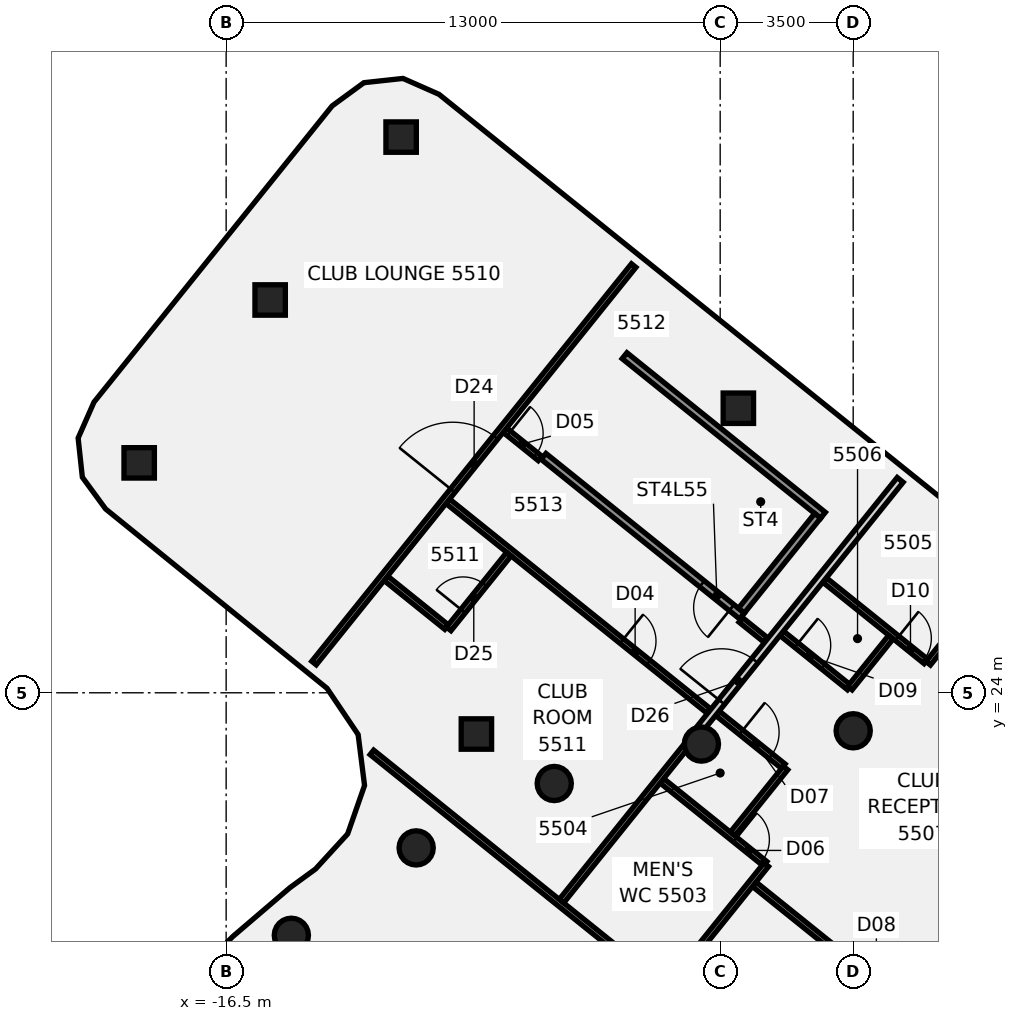
"""IFC4 building model, lengths in metres.
Left out: names, types, materials, properties, quantities, classifications, styles, units other than length and angle.
Written with IfcOpenShell. Run it as: python <this file> out.ifc"""

import sys

from ifc_helpers import new_model, si_unit, direction, frame, frame_2d, origin, origin_2d, place, context, subcontext, project, spatial, polyline, rectangle, circle, outline, extrude, element, fill, save


model = new_model("IFC4")
c1 = context("Model", 3, precision=1e-05, world=origin(), true_north=direction((0.0, 1.0)))
c2 = subcontext(c1, "Body", "Model", "MODEL_VIEW")
j1 = project(units=[si_unit("LENGTHUNIT", "METRE"), si_unit("PLANEANGLEUNIT", "RADIAN")], contexts=[c1])
p1 = place(None, origin())
s1 = spatial("IfcSite", under=j1, at=p1, CompositionType="ELEMENT")
p2 = place(p1, origin())
s2 = spatial("IfcBuilding", under=s1, at=p2, CompositionType="ELEMENT")
p3 = place(p2, frame((0.0, 0.0, 219.9)))
s3 = spatial("IfcBuildingStorey", under=s2, at=p3, CompositionType="ELEMENT", Elevation=219.9)
for number, where, z_axis, x_axis in (
    (1, (0.0, 23.0, -0.14), (0.0, 0.0, 1.0), (1.0, 0.0, 0.0)),
    (2, (-3.994, 22.651, -0.14), (0.0, 0.0, 1.0), (1.0, 0.0, 0.0)),
    (3, (-7.866, 21.613, -0.14), (0.0, 0.0, 1.0), (1.0, 0.0, 0.0)),
    (4, (-11.5, 19.919, -0.14), (0.0, 0.0, 1.0), (1.0, 0.0, 0.0)),
    (5, (-14.784, 17.619, -0.14), (0.0, 0.0, 1.0), (1.0, 0.0, 0.0)),
):
    element("IfcColumn", number, at=place(p3, frame(where, z_axis=z_axis, x_axis=x_axis)), inside=s3, PredefinedType="COLUMN", context=c2, shape_type="SweptSolid", body=[
        extrude(circle(Radius=0.45, at=origin_2d()), origin(), (0.0, 0.0, 1.0), 3.6),
    ])
p4 = place(p3, frame((-9.915, 22.915, -0.134), z_axis=(-0.004139601239, -0.050218113387, 0.998729695558), x_axis=(0.626044507658, 0.7786689847, 0.04174789452)))
e6 = element("IfcColumn", 6, at=p4, inside=s3, PredefinedType="COLUMN", context=c2, shape_type="SweptSolid", body=[
    extrude(rectangle(XDim=0.8, YDim=0.8, at=origin_2d()), origin(), (0.0, 0.0, 1.0), 3.598),
])
p5 = place(p3, frame((-3.022, 31.487, -0.135), z_axis=(-0.047839741947, -0.015743007279, 0.998730953166), x_axis=(0.778936132704, -0.626502812053, 0.027435882672)))
e7 = element("IfcColumn", 7, at=p5, inside=s3, PredefinedType="COLUMN", context=c2, shape_type="SweptSolid", body=[
    extrude(rectangle(XDim=0.8, YDim=0.8, at=origin_2d()), origin(), (0.0, 0.0, 1.0), 3.598),
])
p6 = place(p3, frame((-11.896, 38.622, -0.125), z_axis=(-0.018348621509, -0.110836507046, 0.993669259258), x_axis=(0.626012359155, 0.773649156908, 0.097854525701)))
e8 = element("IfcColumn", 8, at=p6, inside=s3, PredefinedType="COLUMN", context=c2, shape_type="SweptSolid", body=[
    extrude(rectangle(XDim=0.8, YDim=0.8, at=origin_2d()), origin(), (0.0, 0.0, 1.0), 3.606),
])
p7 = place(p3, frame((-15.342, 34.336, -0.127), z_axis=(0.003444931905, -0.127732671233, 0.991802650301), x_axis=(0.626633422835, 0.773203207147, 0.097403048434)))
e9 = element("IfcColumn", 9, at=p7, inside=s3, PredefinedType="COLUMN", context=c2, shape_type="SweptSolid", body=[
    extrude(rectangle(XDim=0.8, YDim=0.8, at=origin_2d()), origin(), (0.0, 0.0, 1.0), 3.614),
])
p8 = place(p3, frame((-18.788, 30.05, -0.129), z_axis=(0.025048097727, -0.144430563508, 0.989197859442), x_axis=(0.627776746317, 0.772342054291, 0.096871605529)))
e10 = element("IfcColumn", 10, at=p8, inside=s3, PredefinedType="COLUMN", context=c2, shape_type="SweptSolid", body=[
    extrude(rectangle(XDim=0.8, YDim=0.8, at=origin_2d()), origin(), (0.0, 0.0, 1.0), 3.626),
])
p9 = place(p3, frame((-12.665, 22.432, 0.0), z_axis=(0.0, 0.0, 1.0), x_axis=(0.779284245227, -0.626670619338, 0.0)))
e11 = element("IfcWall", 11, at=p9, inside=s3, PredefinedType="PARTITIONING", context=c2, shape_type="SweptSolid", body=[
    extrude(rectangle(XDim=16.621, YDim=0.15, at=frame_2d((8.311, 0.0))), origin(), (0.0, 0.0, 1.0), 2.864),
])
p10 = place(p3, frame((-12.294, 27.01, 0.0), z_axis=(0.0, 0.0, 1.0), x_axis=(0.779106968826, -0.626891004184, 0.0)))
e12 = element("IfcWall", 12, at=p10, inside=s3, PredefinedType="PARTITIONING", context=c2, shape_type="SweptSolid", body=[
    extrude(rectangle(XDim=2.045, YDim=0.15, at=frame_2d((1.022, 0.0))), origin(), (0.0, 0.0, 1.0), 2.864),
])
p11 = place(p3, frame((-10.665, 29.036, 0.0), z_axis=(0.0, 0.0, 1.0), x_axis=(0.779529978914, -0.626364919176, 0.0)))
e13 = element("IfcWall", 13, at=p11, inside=s3, PredefinedType="PARTITIONING", context=c2, shape_type="SweptSolid", body=[
    extrude(rectangle(XDim=8.8, YDim=0.15, at=frame_2d((4.4, 0.0))), origin(), (0.0, 0.0, 1.0), 2.864),
])
p12 = place(p11, frame((5.87, 0.0, 0.0)))
e14 = element("IfcOpeningElement", 14, at=p12, cuts=e13, PredefinedType="OPENING", context=c2, shape_type="SweptSolid", body=[
    extrude(rectangle(XDim=0.9, YDim=2.1, at=frame_2d((0.45, 1.05))), frame((0.0, 0.085, 0.0), z_axis=(0.0, -1.0, 0.0), x_axis=(1.0, 0.0, 0.0)), (0.0, 0.0, 1.0), 0.17),
])
p13 = place(p3, frame((-9.161, 30.907, 0.0), z_axis=(0.0, 0.0, 1.0), x_axis=(0.779191494895, -0.626785939763, 0.0)))
e15 = element("IfcWall", 15, at=p13, inside=s3, PredefinedType="PARTITIONING", context=c2, shape_type="SweptSolid", body=[
    extrude(rectangle(XDim=1.181, YDim=0.15, at=frame_2d((0.59, 0.0))), origin(), (0.0, 0.0, 1.0), 2.864),
])
p14 = place(p13, frame((0.131, 0.0, 0.0)))
e16 = element("IfcOpeningElement", 16, at=p14, cuts=e15, PredefinedType="OPENING", context=c2, shape_type="SweptSolid", body=[
    extrude(rectangle(XDim=0.9, YDim=2.1, at=frame_2d((0.45, 1.05))), frame((0.0, 0.085, 0.0), z_axis=(0.0, -1.0, 0.0), x_axis=(1.0, 0.0, 0.0)), (0.0, 0.0, 1.0), 0.17),
])
p15 = place(p3, frame((-2.958, 25.918, 0.0), z_axis=(0.0, 0.0, 1.0), x_axis=(0.77922270064, -0.626747144235, 0.0)))
e17 = element("IfcWall", 17, at=p15, inside=s3, PredefinedType="PARTITIONING", context=c2, shape_type="SweptSolid", body=[
    extrude(rectangle(XDim=0.841, YDim=0.15, at=frame_2d((0.42, 0.0))), origin(), (0.0, 0.0, 1.0), 2.864),
])
p16 = place(p3, frame((-5.03, 21.682, 0.0), z_axis=(0.0, 0.0, 1.0), x_axis=(0.779278251962, -0.626678072074, 0.0)))
e18 = element("IfcWall", 18, at=p16, inside=s3, PredefinedType="PARTITIONING", context=c2, shape_type="SweptSolid", body=[
    extrude(rectangle(XDim=3.48, YDim=0.15, at=frame_2d((1.74, 0.0))), origin(), (0.0, 0.0, 1.0), 2.864),
])
p17 = place(p16, frame((2.47, 0.0, 0.0)))
e19 = element("IfcOpeningElement", 19, at=p17, cuts=e18, PredefinedType="OPENING", context=c2, shape_type="SweptSolid", body=[
    extrude(rectangle(XDim=0.9, YDim=2.1, at=frame_2d((0.45, 1.05))), frame((0.0, 0.085, 0.0), z_axis=(0.0, -1.0, 0.0), x_axis=(1.0, 0.0, 0.0)), (0.0, 0.0, 1.0), 0.17),
])
p18 = place(p3, frame((-3.558, 23.449, 0.0), z_axis=(0.0, 0.0, 1.0), x_axis=(0.779441374228, -0.626475174401, 0.0)))
e20 = element("IfcWall", 20, at=p18, inside=s3, PredefinedType="PARTITIONING", context=c2, shape_type="SweptSolid", body=[
    extrude(rectangle(XDim=2.206, YDim=0.15, at=frame_2d((1.103, 0.0))), origin(), (0.0, 0.0, 1.0), 2.864),
])
p19 = place(p18, frame((0.78, 0.0, 0.0)))
e21 = element("IfcOpeningElement", 21, at=p19, cuts=e20, PredefinedType="OPENING", context=c2, shape_type="SweptSolid", body=[
    extrude(rectangle(XDim=1.0, YDim=2.1, at=frame_2d((0.5, 1.05))), frame((0.0, 0.085, 0.0), z_axis=(0.0, -1.0, 0.0), x_axis=(1.0, 0.0, 0.0)), (0.0, 0.0, 1.0), 0.17),
])
p20 = place(p3, frame((-2.601, 18.959, 0.0), z_axis=(0.0, 0.0, 1.0), x_axis=(0.779260240467, -0.626700468826, 0.0)))
e22 = element("IfcWall", 22, at=p20, inside=s3, PredefinedType="PARTITIONING", context=c2, shape_type="SweptSolid", body=[
    extrude(rectangle(XDim=11.079, YDim=0.15, at=frame_2d((5.54, 0.0))), origin(), (0.0, 0.0, 1.0), 2.864),
])
p21 = place(p20, frame((3.67, 0.0, 0.0)))
e23 = element("IfcOpeningElement", 23, at=p21, cuts=e22, PredefinedType="OPENING", context=c2, shape_type="SweptSolid", body=[
    extrude(rectangle(XDim=0.9, YDim=2.1, at=frame_2d((0.45, 1.05))), frame((0.0, 0.085, 0.0), z_axis=(0.0, -1.0, 0.0), x_axis=(1.0, 0.0, 0.0)), (0.0, 0.0, 1.0), 0.17),
])
p22 = place(p3, frame((-1.881, 25.565, 0.0), z_axis=(0.0, 0.0, 1.0), x_axis=(0.779446392233, -0.626468931101, 0.0)))
e24 = element("IfcWall", 24, at=p22, inside=s3, PredefinedType="PARTITIONING", context=c2, shape_type="SweptSolid", body=[
    extrude(rectangle(XDim=2.281, YDim=0.15, at=frame_2d((1.14, 0.0))), origin(), (0.0, 0.0, 1.0), 2.864),
])
p23 = place(p22, frame((0.5, 0.0, 0.0)))
e25 = element("IfcOpeningElement", 25, at=p23, cuts=e24, PredefinedType="OPENING", context=c2, shape_type="SweptSolid", body=[
    extrude(rectangle(XDim=0.9, YDim=2.1, at=frame_2d((0.45, 1.05))), frame((0.0, 0.085, 0.0), z_axis=(0.0, -1.0, 0.0), x_axis=(1.0, 0.0, 0.0)), (0.0, 0.0, 1.0), 0.17),
])
p24 = place(p3, frame((-0.738, 26.956, 0.0), z_axis=(0.0, 0.0, 1.0), x_axis=(0.779423789997, -0.626497051539, 0.0)))
e26 = element("IfcWall", 26, at=p24, inside=s3, PredefinedType="PARTITIONING", context=c2, shape_type="SweptSolid", body=[
    extrude(rectangle(XDim=3.4, YDim=0.15, at=frame_2d((1.7, 0.0))), origin(), (0.0, 0.0, 1.0), 2.864),
])
p25 = place(p24, frame((2.43, 0.0, 0.0)))
e27 = element("IfcOpeningElement", 27, at=p25, cuts=e26, PredefinedType="OPENING", context=c2, shape_type="SweptSolid", body=[
    extrude(rectangle(XDim=0.9, YDim=2.1, at=frame_2d((0.45, 1.05))), frame((0.0, 0.085, 0.0), z_axis=(0.0, -1.0, 0.0), x_axis=(1.0, 0.0, 0.0)), (0.0, 0.0, 1.0), 0.17),
])
p26 = place(p3, frame((-14.188, 24.782, 0.0), z_axis=(0.0, 0.0, 1.0), x_axis=(0.626733675184, 0.779233533923, 0.0)))
e28 = element("IfcWall", 28, at=p26, inside=s3, PredefinedType="PARTITIONING", context=c2, shape_type="SweptSolid", body=[
    extrude(rectangle(XDim=13.422, YDim=0.15, at=frame_2d((6.711, 0.0))), origin(), (0.0, 0.0, 1.0), 2.864),
])
p27 = place(p26, frame((5.823, 0.0, 0.0)))
e29 = element("IfcOpeningElement", 29, at=p27, cuts=e28, PredefinedType="OPENING", context=c2, shape_type="SweptSolid", body=[
    extrude(rectangle(XDim=1.8, YDim=2.1, at=frame_2d((0.9, 1.05))), frame((0.0, 0.085, 0.0), z_axis=(0.0, -1.0, 0.0), x_axis=(1.0, 0.0, 0.0)), (0.0, 0.0, 1.0), 0.17),
])
p28 = place(p3, frame((-10.642, 25.681, 0.0), z_axis=(0.0, 0.0, 1.0), x_axis=(0.626676843838, 0.77927923968, 0.0)))
e30 = element("IfcWall", 30, at=p28, inside=s3, PredefinedType="PARTITIONING", context=c2, shape_type="SweptSolid", body=[
    extrude(rectangle(XDim=2.521, YDim=0.15, at=frame_2d((1.261, 0.0))), origin(), (0.0, 0.0, 1.0), 2.864),
])
p29 = place(p28, frame((0.6, 0.0, 0.0)))
e31 = element("IfcOpeningElement", 31, at=p29, cuts=e30, PredefinedType="OPENING", context=c2, shape_type="SweptSolid", body=[
    extrude(rectangle(XDim=0.9, YDim=2.1, at=frame_2d((0.45, 1.05))), frame((0.0, 0.085, 0.0), z_axis=(0.0, -1.0, 0.0), x_axis=(1.0, 0.0, 0.0)), (0.0, 0.0, 1.0), 0.17),
])
p30 = place(p3, frame((-7.674, 18.521, 0.0), z_axis=(0.0, 0.0, 1.0), x_axis=(0.626662098772, 0.779291097064, 0.0)))
e32 = element("IfcWall", 32, at=p30, inside=s3, PredefinedType="PARTITIONING", context=c2, shape_type="SweptSolid", body=[
    extrude(rectangle(XDim=5.307, YDim=0.15, at=frame_2d((2.654, 0.0))), origin(), (0.0, 0.0, 1.0), 2.864),
])
p31 = place(p3, frame((-4.066, 23.008, 0.0), z_axis=(0.0, 0.0, 1.0), x_axis=(0.62666000118, 0.779292783824, 0.0)))
e33 = element("IfcWall", 33, at=p31, inside=s3, PredefinedType="PARTITIONING", context=c2, shape_type="SweptSolid", body=[
    extrude(rectangle(XDim=8.461, YDim=0.2, at=frame_2d((4.231, 0.0))), origin(), (0.0, 0.0, 1.0), 2.864),
])
p32 = place(p31, frame((0.962, 0.0, 0.0)))
e34 = element("IfcOpeningElement", 34, at=p32, cuts=e33, PredefinedType="OPENING", context=c2, shape_type="SweptSolid", body=[
    extrude(rectangle(XDim=1.4, YDim=2.1, at=frame_2d((0.7, 1.05))), frame((0.0, 0.11, 0.0), z_axis=(0.0, -1.0, 0.0), x_axis=(1.0, 0.0, 0.0)), (0.0, 0.0, 1.0), 0.22),
])
p33 = place(p3, frame((-4.869, 16.265, 0.0), z_axis=(0.0, 0.0, 1.0), x_axis=(0.626586553854, 0.779351840012, 0.0)))
e35 = element("IfcWall", 35, at=p33, inside=s3, PredefinedType="PARTITIONING", context=c2, shape_type="SweptSolid", body=[
    extrude(rectangle(XDim=4.12, YDim=0.15, at=frame_2d((2.06, 0.0))), origin(), (0.0, 0.0, 1.0), 2.864),
])
p34 = place(p3, frame((1.974, 24.776, 0.0), z_axis=(0.0, 0.0, 1.0), x_axis=(0.626641118129, 0.779307968053, 0.0)))
e36 = element("IfcWall", 36, at=p34, inside=s3, PredefinedType="PARTITIONING", context=c2, shape_type="SweptSolid", body=[
    extrude(rectangle(XDim=2.797, YDim=0.15, at=frame_2d((1.398, 0.0))), origin(), (0.0, 0.0, 1.0), 2.864),
])
p35 = place(p3, frame((-3.172, 20.29, 0.0), z_axis=(0.0, 0.0, 1.0), x_axis=(0.626905231465, 0.779095520949, 0.0)))
e37 = element("IfcWall", 37, at=p35, inside=s3, PredefinedType="PARTITIONING", context=c2, shape_type="SweptSolid", body=[
    extrude(rectangle(XDim=2.22, YDim=0.15, at=frame_2d((1.11, 0.0))), origin(), (0.0, 0.0, 1.0), 2.864),
])
p36 = place(p3, frame((-0.087, 24.124, 0.0), z_axis=(0.0, 0.0, 1.0), x_axis=(0.62701150586, 0.779009994492, 0.0)))
e38 = element("IfcWall", 38, at=p36, inside=s3, PredefinedType="PARTITIONING", context=c2, shape_type="SweptSolid", body=[
    extrude(rectangle(XDim=1.72, YDim=0.15, at=frame_2d((0.86, 0.0))), origin(), (0.0, 0.0, 1.0), 2.864),
])
p37 = place(p3, frame((-2.926, 26.021, -0.14), z_axis=(0.0, 0.0, 1.0), x_axis=(-0.779295070633, 0.626657157373, 0.0)))
e39 = element("IfcWall", 39, at=p37, inside=s3, PredefinedType="SHEAR", context=c2, shape_type="SweptSolid", body=[
    extrude(rectangle(XDim=6.7, YDim=0.2, at=frame_2d((3.35, 0.0))), origin(), (0.0, 0.0, 1.0), 3.004),
])
p38 = place(p37, frame((0.35, 0.0, 0.0)))
e40 = element("IfcOpeningElement", 40, at=p38, cuts=e39, PredefinedType="OPENING", context=c2, shape_type="SweptSolid", body=[
    extrude(rectangle(XDim=1.0, YDim=2.1, at=frame_2d((0.5, 1.05))), frame((0.0, 0.11, 0.0), z_axis=(0.0, -1.0, 0.0), x_axis=(1.0, 0.0, 0.0)), (0.0, 0.0, 1.0), 0.22),
])
p39 = place(p3, frame((-0.795, 28.671, -0.14), z_axis=(0.0, 0.0, 1.0), x_axis=(-0.779280760932, 0.626674952142, 0.0)))
e41 = element("IfcWall", 41, at=p39, inside=s3, PredefinedType="SHEAR", context=c2, shape_type="SweptSolid", body=[
    extrude(rectangle(XDim=6.7, YDim=0.2, at=frame_2d((3.35, 0.0))), origin(), (0.0, 0.0, 1.0), 3.004),
])
p40 = place(p3, frame((-0.936, 28.656, -0.14), z_axis=(0.0, 0.0, 1.0), x_axis=(-0.626646862977, -0.779303348589, 0.0)))
e42 = element("IfcWall", 42, at=p40, inside=s3, PredefinedType="SHEAR", context=c2, shape_type="SweptSolid", body=[
    extrude(rectangle(XDim=3.2, YDim=0.2, at=frame_2d((1.6, 0.0))), origin(), (0.0, 0.0, 1.0), 3.6),
])
p41 = place(p3, frame((0.0, 0.0, -0.14)))
e43 = element("IfcWall", 43, at=p41, inside=s3, PredefinedType="SHEAR", context=c2, shape_type="SweptSolid", body=[
    extrude(outline(polyline([(-5.923, 32.666), (-6.079, 32.792), (-8.084, 30.298), (-7.929, 30.172), (-5.923, 32.666)])), origin(), (0.0, 0.0, 1.0), 3.004),
])
p42 = place(p12, frame((0.9, 0.0, 0.0), z_axis=(0.0, 0.0, 1.0), x_axis=(-1.0, 0.0, 0.0)))
e44 = element("IfcDoor", 44, at=p42, inside=s3, OperationType="SINGLE_SWING_RIGHT", PredefinedType="DOOR", context=c2, shape_type="SweptSolid", body=[
    extrude(rectangle(XDim=0.9, YDim=2.1, at=frame_2d((0.45, 1.05))), frame((0.0, 0.025, 0.0), z_axis=(0.0, -1.0, 0.0), x_axis=(1.0, 0.0, 0.0)), (0.0, 0.0, 1.0), 0.05),
])
fill(e14, e44)
p43 = place(p14, origin())
e45 = element("IfcDoor", 45, at=p43, inside=s3, OperationType="SINGLE_SWING_RIGHT", PredefinedType="DOOR", context=c2, shape_type="SweptSolid", body=[
    extrude(rectangle(XDim=0.9, YDim=2.1, at=frame_2d((0.45, 1.05))), frame((0.0, 0.025, 0.0), z_axis=(0.0, -1.0, 0.0), x_axis=(1.0, 0.0, 0.0)), (0.0, 0.0, 1.0), 0.05),
])
fill(e16, e45)
p44 = place(p17, frame((0.9, 0.0, 0.0), z_axis=(0.0, 0.0, 1.0), x_axis=(-1.0, 0.0, 0.0)))
e46 = element("IfcDoor", 46, at=p44, inside=s3, OperationType="SINGLE_SWING_RIGHT", PredefinedType="DOOR", context=c2, shape_type="SweptSolid", body=[
    extrude(rectangle(XDim=0.9, YDim=2.1, at=frame_2d((0.45, 1.05))), frame((0.0, 0.025, 0.0), z_axis=(0.0, -1.0, 0.0), x_axis=(1.0, 0.0, 0.0)), (0.0, 0.0, 1.0), 0.05),
])
fill(e19, e46)
p45 = place(p19, frame((1.0, 0.0, 0.0), z_axis=(0.0, 0.0, 1.0), x_axis=(-1.0, 0.0, 0.0)))
e47 = element("IfcDoor", 47, at=p45, inside=s3, OperationType="SINGLE_SWING_RIGHT", PredefinedType="DOOR", context=c2, shape_type="SweptSolid", body=[
    extrude(rectangle(XDim=1.0, YDim=2.1, at=frame_2d((0.5, 1.05))), frame((0.0, 0.025, 0.0), z_axis=(0.0, -1.0, 0.0), x_axis=(1.0, 0.0, 0.0)), (0.0, 0.0, 1.0), 0.05),
])
fill(e21, e47)
p46 = place(p23, origin())
e48 = element("IfcDoor", 48, at=p46, inside=s3, OperationType="SINGLE_SWING_RIGHT", PredefinedType="DOOR", context=c2, shape_type="SweptSolid", body=[
    extrude(rectangle(XDim=0.9, YDim=2.1, at=frame_2d((0.45, 1.05))), frame((0.0, 0.025, 0.0), z_axis=(0.0, -1.0, 0.0), x_axis=(1.0, 0.0, 0.0)), (0.0, 0.0, 1.0), 0.05),
])
fill(e25, e48)
p47 = place(p25, origin())
e49 = element("IfcDoor", 49, at=p47, inside=s3, OperationType="SINGLE_SWING_LEFT", PredefinedType="DOOR", context=c2, shape_type="SweptSolid", body=[
    extrude(rectangle(XDim=0.9, YDim=2.1, at=frame_2d((0.45, 1.05))), frame((0.0, 0.025, 0.0), z_axis=(0.0, -1.0, 0.0), x_axis=(1.0, 0.0, 0.0)), (0.0, 0.0, 1.0), 0.05),
])
fill(e27, e49)
p48 = place(p27, origin())
e50 = element("IfcDoor", 50, at=p48, inside=s3, OperationType="DOUBLE_DOOR_SINGLE_SWING", PredefinedType="DOOR", context=c2, shape_type="SweptSolid", body=[
    extrude(rectangle(XDim=1.8, YDim=2.1, at=frame_2d((0.9, 1.05))), frame((0.0, 0.025, 0.0), z_axis=(0.0, -1.0, 0.0), x_axis=(1.0, 0.0, 0.0)), (0.0, 0.0, 1.0), 0.05),
])
fill(e29, e50)
p49 = place(p29, origin())
e51 = element("IfcDoor", 51, at=p49, inside=s3, OperationType="SINGLE_SWING_RIGHT", PredefinedType="DOOR", context=c2, shape_type="SweptSolid", body=[
    extrude(rectangle(XDim=0.9, YDim=2.1, at=frame_2d((0.45, 1.05))), frame((0.0, 0.025, 0.0), z_axis=(0.0, -1.0, 0.0), x_axis=(1.0, 0.0, 0.0)), (0.0, 0.0, 1.0), 0.05),
])
fill(e31, e51)
p50 = place(p32, frame((1.4, 0.0, 0.0), z_axis=(0.0, 0.0, 1.0), x_axis=(-1.0, 0.0, 0.0)))
e52 = element("IfcDoor", 52, at=p50, inside=s3, OperationType="DOUBLE_DOOR_SINGLE_SWING", PredefinedType="DOOR", context=c2, shape_type="SweptSolid", body=[
    extrude(rectangle(XDim=1.4, YDim=2.1, at=frame_2d((0.7, 1.05))), frame((0.0, 0.025, 0.0), z_axis=(0.0, -1.0, 0.0), x_axis=(1.0, 0.0, 0.0)), (0.0, 0.0, 1.0), 0.05),
])
fill(e34, e52)
p51 = place(p38, origin())
e53 = element("IfcDoor", 53, at=p51, inside=s3, OperationType="SINGLE_SWING_LEFT", PredefinedType="DOOR", context=c2, shape_type="SweptSolid", body=[
    extrude(rectangle(XDim=1.0, YDim=2.1, at=frame_2d((0.5, 1.05))), frame((0.0, 0.025, 0.0), z_axis=(0.0, -1.0, 0.0), x_axis=(1.0, 0.0, 0.0)), (0.0, 0.0, 1.0), 0.05),
])
fill(e40, e53)
save(model, sys.argv[1])
